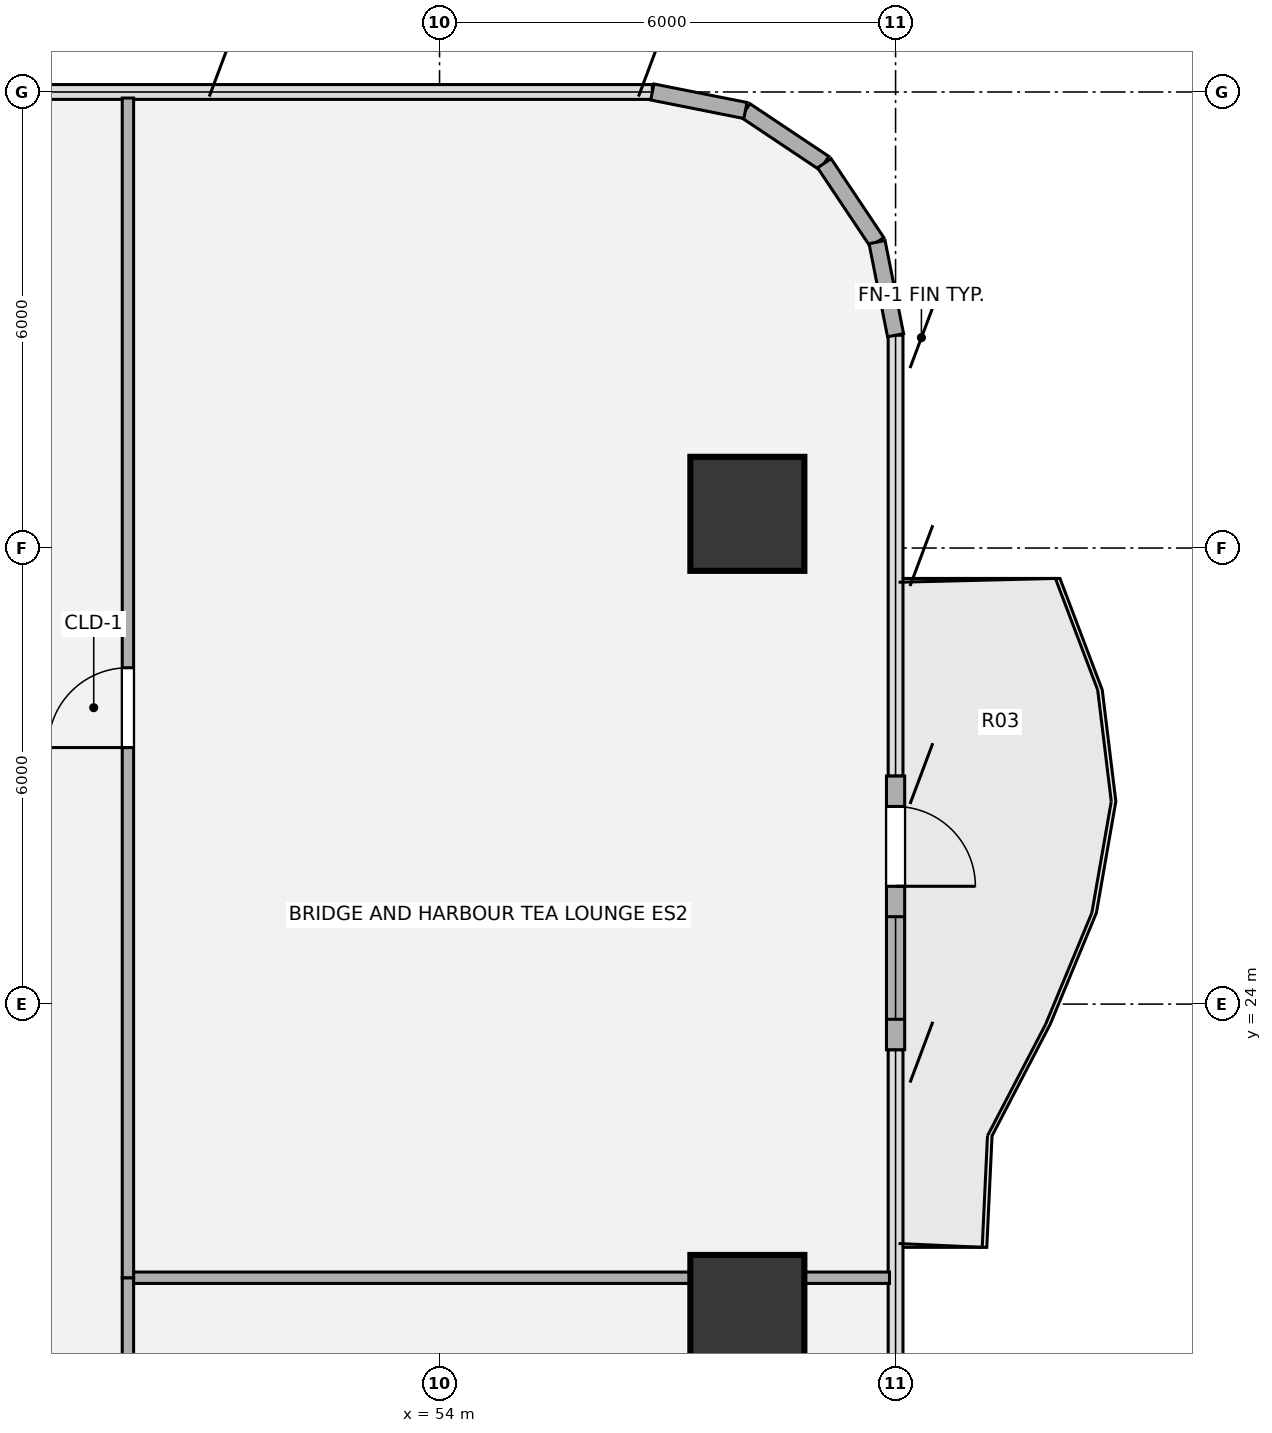
"""IFC4 building model, lengths in metres.
Left out: names, types, materials, properties, quantities, classifications, styles, units other than length and angle.
Written with IfcOpenShell. Run it as: python <this file> out.ifc"""

import sys

from ifc_helpers import new_model, si_unit, direction, frame, frame_2d, origin, origin_2d, place, context, subcontext, project, spatial, rectangle, hollow_circle, extrude, source, transform, mapped, element, fill, save


model = new_model("IFC4")
c1 = context("Model", 3, precision=1e-05, world=origin(), true_north=direction((0.0, 1.0)))
c2 = subcontext(c1, "Body", "Model", "MODEL_VIEW")
j1 = project(units=[si_unit("LENGTHUNIT", "METRE"), si_unit("PLANEANGLEUNIT", "RADIAN")], contexts=[c1])
p1 = place(None, origin())
s1 = spatial("IfcSite", under=j1, at=p1, CompositionType="ELEMENT")
p2 = place(p1, origin())
s2 = spatial("IfcBuilding", under=s1, at=p2, CompositionType="ELEMENT")
p3 = place(p2, frame((0.0, 0.0, 57.24)))
s3 = spatial("IfcBuildingStorey", under=s2, at=p3, CompositionType="ELEMENT", Elevation=57.24)
m1 = source(origin(), c2, "Body", "SweptSolid", [
    extrude(hollow_circle(Radius=0.75, WallThickness=0.05, at=origin_2d()), origin(), (0.0, 0.0, 1.0), 3.78),
])
for number, where, z_axis, x_axis in (
    (1, (58.05, 19.95, 0.0), (0.0, 0.0, 1.0), (1.0, 0.0, 0.0)),
    (2, (58.05, 30.45, 0.0), (0.0, 0.0, 1.0), (1.0, 0.0, 0.0)),
):
    element("IfcColumn", number, at=place(p3, frame(where, z_axis=z_axis, x_axis=x_axis)), inside=s3, PredefinedType="COLUMN", context=c2, shape_type="MappedRepresentation", body=[
        mapped(m1, transform((0.0, 0.0, 0.0), x_axis=(1.0, 0.0, 0.0), y_axis=(0.0, 1.0, 0.0), z_axis=(0.0, 0.0, 1.0), scale=1.0)),
    ])
for number, where, z_axis, x_axis in (
    (3, (58.025, 35.756, 0.0), (0.0, 0.0, 1.0), (0.831, -0.556, 0.0)),
    (4, (59.063, 35.063, 0.0), (0.0, 0.0, 1.0), (0.556, -0.831, 0.0)),
    (5, (59.756, 34.025, 0.0), (0.0, 0.0, 1.0), (0.195, -0.981, 0.0)),
):
    element("IfcWall", number, at=place(p3, frame(where, z_axis=z_axis, x_axis=x_axis)), inside=s3, PredefinedType="SOLIDWALL", context=c2, shape_type="SweptSolid", body=[
        extrude(rectangle(XDim=1.249, YDim=0.215, at=frame_2d((0.624, 0.0))), origin(), (0.0, 0.0, 1.0), 3.53),
    ])
p4 = place(p3, frame((60.0, 27.0, 0.0), z_axis=(0.0, 0.0, 1.0), x_axis=(0.0, -1.0, 0.0)))
e6 = element("IfcWall", 6, at=p4, inside=s3, PredefinedType="SOLIDWALL", context=c2, shape_type="SweptSolid", body=[
    extrude(rectangle(XDim=3.6, YDim=0.24, at=frame_2d((1.8, 0.0))), origin(), (0.0, 0.0, 1.0), 3.53),
])
p5 = place(p4, frame((0.4, 0.0, 0.0)))
e7 = element("IfcOpeningElement", 7, at=p5, cuts=e6, PredefinedType="OPENING", context=c2, shape_type="SweptSolid", body=[
    extrude(rectangle(XDim=1.05, YDim=2.15, at=origin_2d()), frame((0.525, 0.13, 1.075), z_axis=(0.0, -1.0, 0.0), x_axis=(1.0, 0.0, 0.0)), (0.0, 0.0, 1.0), 0.26),
])
p6 = place(p4, frame((1.85, 0.0, 0.85)))
e8 = element("IfcOpeningElement", 8, at=p6, cuts=e6, PredefinedType="OPENING", context=c2, shape_type="SweptSolid", body=[
    extrude(rectangle(XDim=1.35, YDim=1.35, at=origin_2d()), frame((0.675, 0.13, 0.675), z_axis=(0.0, -1.0, 0.0), x_axis=(1.0, 0.0, 0.0)), (0.0, 0.0, 1.0), 0.26),
])
p7 = place(p3, frame((56.8, 36.0, 0.0), z_axis=(0.0, 0.0, 1.0), x_axis=(0.980775717779, -0.195138390419, 0.0)))
e9 = element("IfcWall", 9, at=p7, inside=s3, PredefinedType="SOLIDWALL", context=c2, shape_type="SweptSolid", body=[
    extrude(rectangle(XDim=1.249, YDim=0.215, at=frame_2d((0.624, 0.0))), origin(), (0.0, 0.0, 1.0), 3.53),
])
p8 = place(p3, frame((49.9, 20.4, 0.0), z_axis=(0.0, 0.0, 1.0), x_axis=(1.0, 0.0, 0.0)))
e10 = element("IfcWall", 10, at=p8, inside=s3, PredefinedType="PARTITIONING", context=c2, shape_type="SweptSolid", body=[
    extrude(rectangle(XDim=10.02, YDim=0.15, at=frame_2d((5.01, 0.0))), origin(), (0.0, 0.0, 1.0), 2.982),
])
p9 = place(p3, frame((49.9, 6.08, 0.0), z_axis=(0.0, 0.0, 1.0), x_axis=(0.0, 1.0, 0.0)))
e11 = element("IfcWall", 11, at=p9, inside=s3, PredefinedType="PARTITIONING", context=c2, shape_type="SweptSolid", body=[
    extrude(rectangle(XDim=14.32, YDim=0.15, at=frame_2d((7.16, 0.0))), origin(), (0.0, 0.0, 1.0), 3.5),
])
p10 = place(p9, frame((6.635, 0.0, 0.0)))
e12 = element("IfcOpeningElement", 12, at=p10, cuts=e11, PredefinedType="OPENING", context=c2, shape_type="SweptSolid", body=[
    extrude(rectangle(XDim=1.05, YDim=2.1, at=origin_2d()), frame((0.525, 0.085, 1.05), z_axis=(0.0, -1.0, 0.0), x_axis=(1.0, 0.0, 0.0)), (0.0, 0.0, 1.0), 0.17),
])
p11 = place(p3, frame((49.9, 20.4, 0.0), z_axis=(0.0, 0.0, 1.0), x_axis=(0.0, 1.0, 0.0)))
e13 = element("IfcWall", 13, at=p11, inside=s3, PredefinedType="PARTITIONING", context=c2, shape_type="SweptSolid", body=[
    extrude(rectangle(XDim=15.52, YDim=0.15, at=frame_2d((7.76, 0.0))), origin(), (0.0, 0.0, 1.0), 3.5),
])
p12 = place(p11, frame((6.975, 0.0, 0.0)))
e14 = element("IfcOpeningElement", 14, at=p12, cuts=e13, PredefinedType="OPENING", context=c2, shape_type="SweptSolid", body=[
    extrude(rectangle(XDim=1.05, YDim=2.1, at=origin_2d()), frame((0.525, 0.085, 1.05), z_axis=(0.0, -1.0, 0.0), x_axis=(1.0, 0.0, 0.0)), (0.0, 0.0, 1.0), 0.17),
])
m2 = source(origin(), c2, "Body", "SweptSolid", [
    extrude(rectangle(XDim=1.05, YDim=2.15, at=origin_2d()), frame((0.525, 0.025, 1.075), z_axis=(0.0, -1.0, 0.0), x_axis=(1.0, 0.0, 0.0)), (0.0, 0.0, 1.0), 0.05),
])
p13 = place(p5, origin())
e15 = element("IfcDoor", 15, at=p13, inside=s3, OperationType="SINGLE_SWING_RIGHT", PredefinedType="DOOR", context=c2, shape_type="MappedRepresentation", body=[
    mapped(m2, transform((0.0, 0.0, 0.0), x_axis=(1.0, 0.0, 0.0), y_axis=(0.0, 1.0, 0.0), z_axis=(0.0, 0.0, 1.0), scale=1.0)),
])
fill(e7, e15)
m3 = source(origin(), c2, "Body", "SweptSolid", [
    extrude(rectangle(XDim=1.35, YDim=1.35, at=origin_2d()), frame((0.675, 0.03, 0.675), z_axis=(0.0, -1.0, 0.0), x_axis=(1.0, 0.0, 0.0)), (0.0, 0.0, 1.0), 0.06),
])
p14 = place(p6, origin())
e16 = element("IfcWindow", 16, at=p14, inside=s3, PartitioningType="SINGLE_PANEL", PredefinedType="WINDOW", context=c2, shape_type="MappedRepresentation", body=[
    mapped(m3, transform((0.0, 0.0, 0.0), x_axis=(1.0, 0.0, 0.0), y_axis=(0.0, 1.0, 0.0), z_axis=(0.0, 0.0, 1.0), scale=1.0)),
])
fill(e8, e16)
m4 = source(origin(), c2, "Body", "SweptSolid", [
    extrude(rectangle(XDim=1.05, YDim=2.1, at=origin_2d()), frame((0.525, 0.025, 1.05), z_axis=(0.0, -1.0, 0.0), x_axis=(1.0, 0.0, 0.0)), (0.0, 0.0, 1.0), 0.05),
])
p15 = place(p12, origin())
e17 = element("IfcDoor", 17, at=p15, inside=s3, OperationType="SINGLE_SWING_LEFT", PredefinedType="DOOR", context=c2, shape_type="MappedRepresentation", body=[
    mapped(m4, transform((0.0, 0.0, 0.0), x_axis=(1.0, 0.0, 0.0), y_axis=(0.0, 1.0, 0.0), z_axis=(0.0, 0.0, 1.0), scale=1.0)),
])
fill(e14, e17)
save(model, sys.argv[1])
